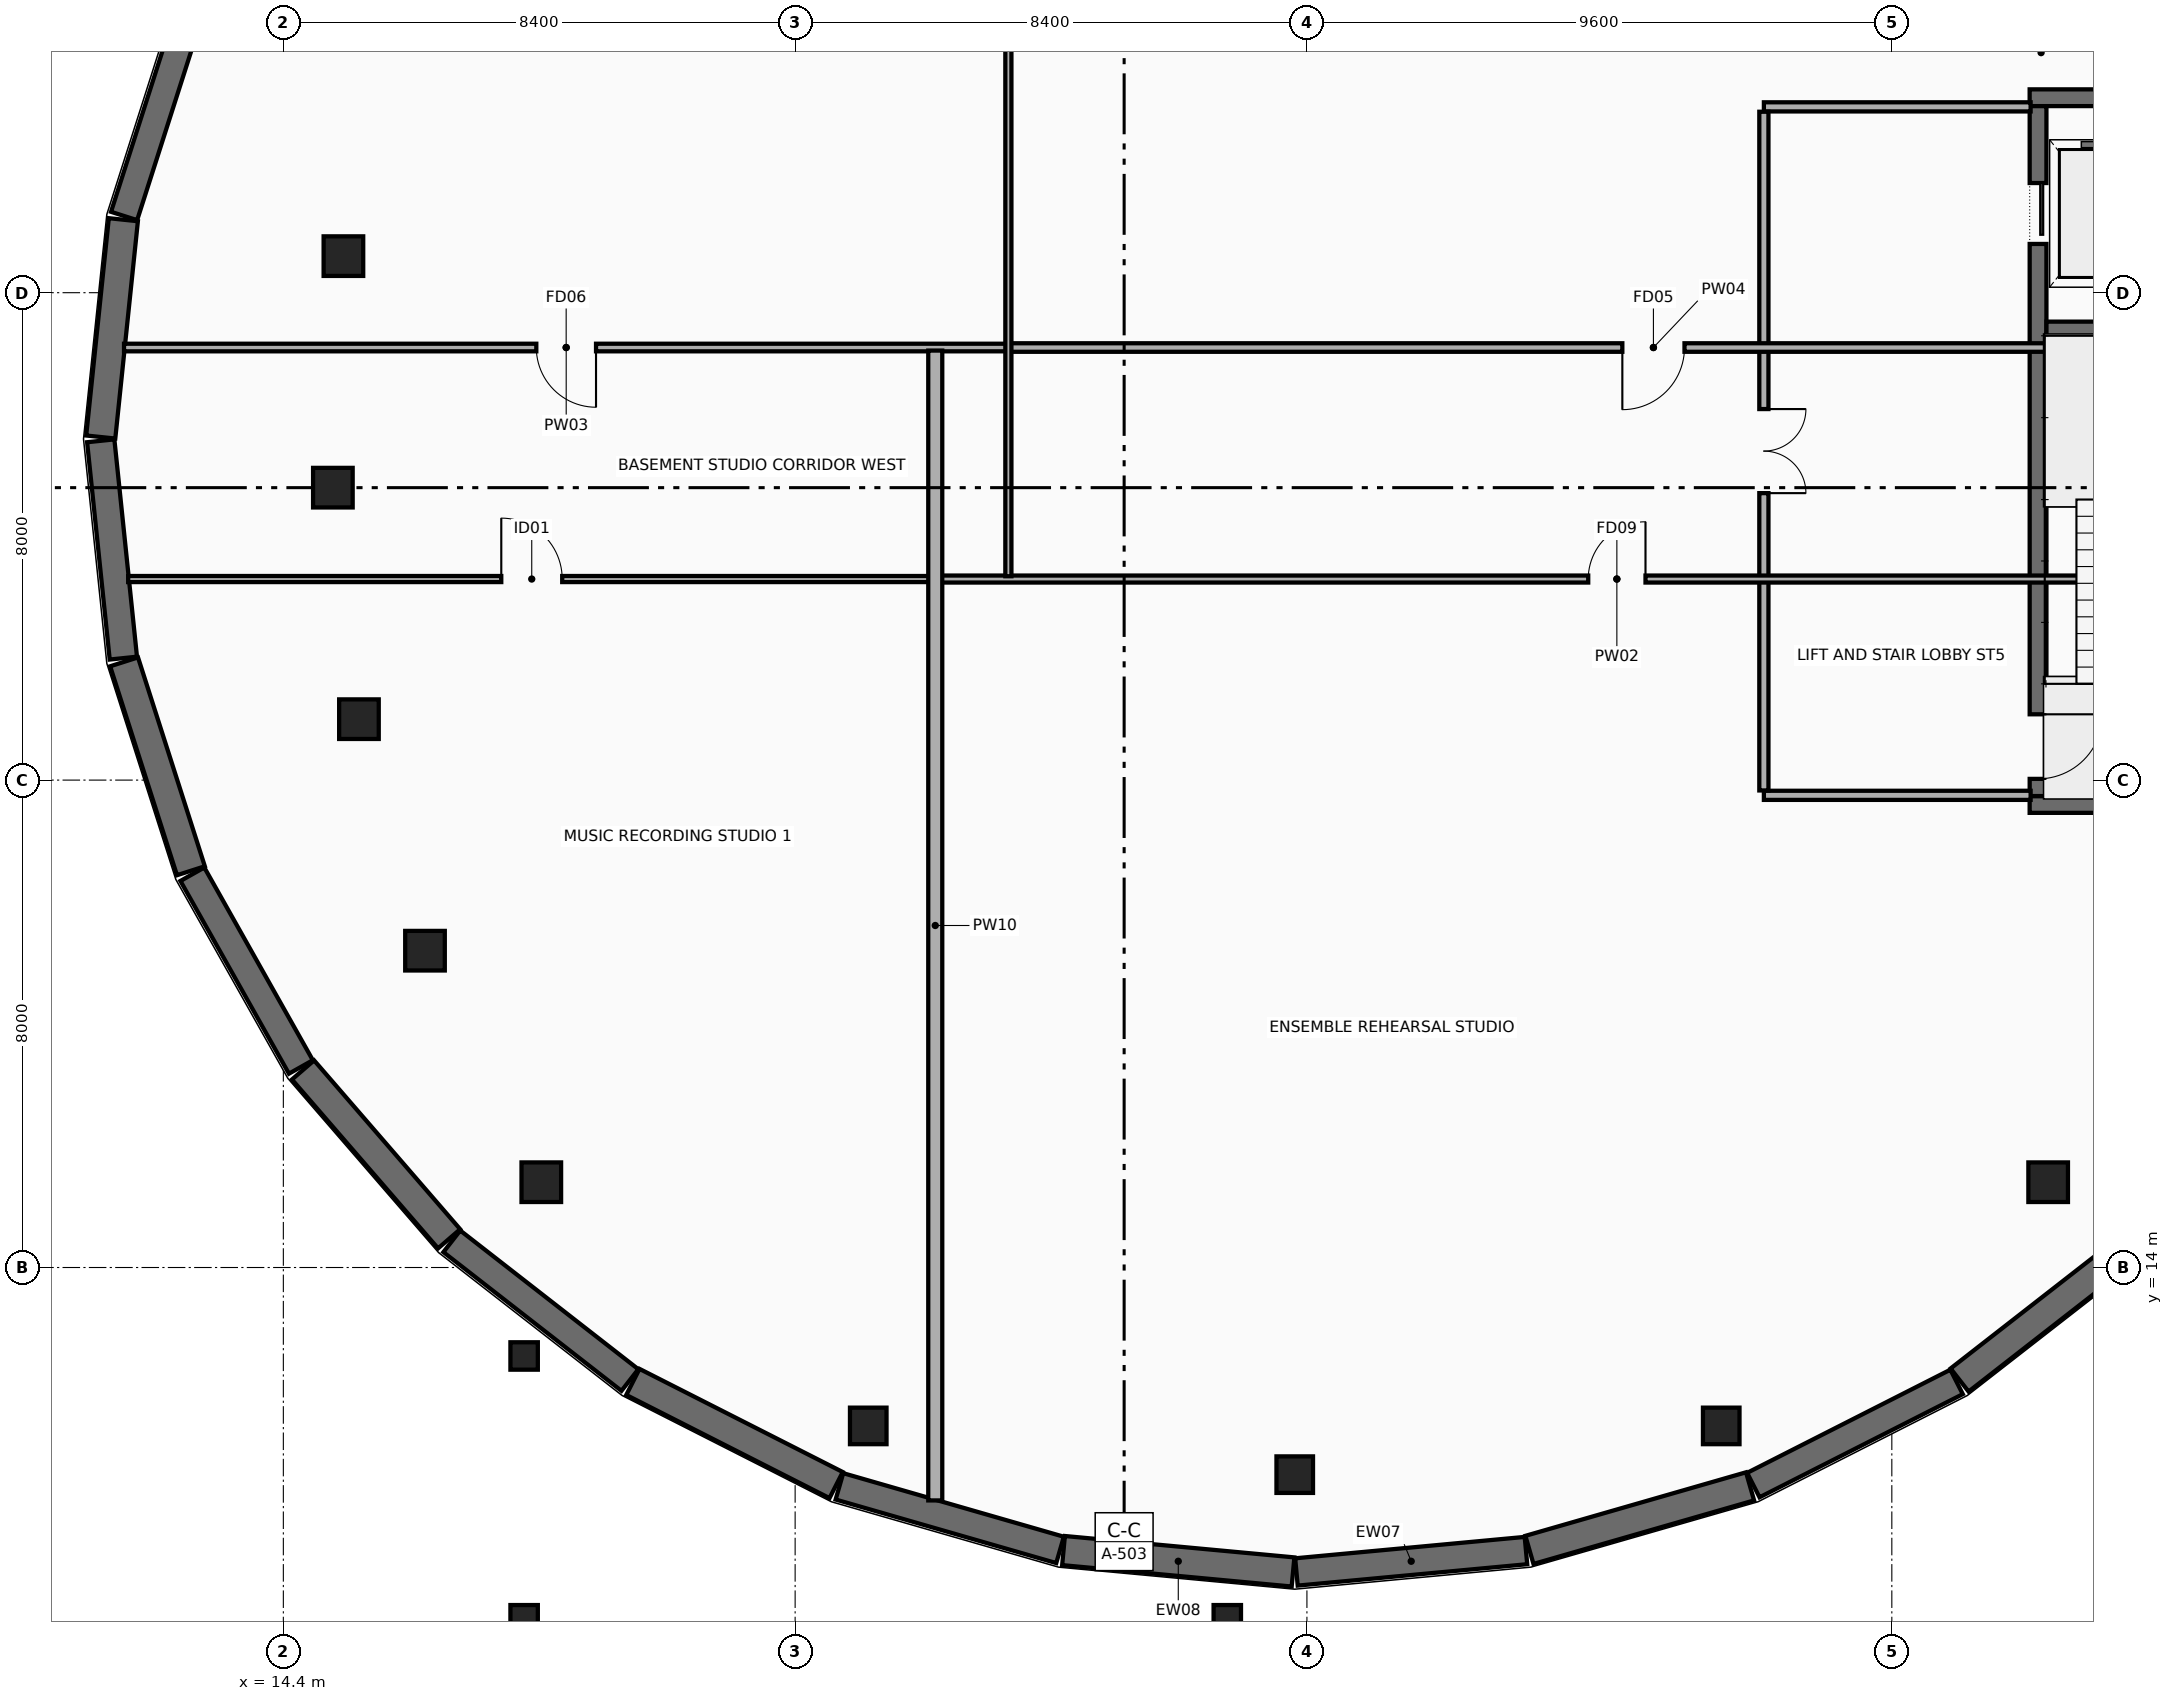
"""IFC4 building model, lengths in metres.
Left out: names, types, materials, properties, quantities, classifications, styles, units other than length and angle.
Written with IfcOpenShell. Run it as: python <this file> out.ifc"""

import sys

from ifc_helpers import new_model, si_unit, direction, frame, frame_2d, origin, origin_2d, place, context, subcontext, project, spatial, rectangle, extrude, element, fill, save


model = new_model("IFC4")
c1 = context("Model", 3, precision=1e-05, world=origin(), true_north=direction((0.0, 1.0)))
c2 = subcontext(c1, "Body", "Model", "MODEL_VIEW")
j1 = project(units=[si_unit("LENGTHUNIT", "METRE"), si_unit("PLANEANGLEUNIT", "RADIAN")], contexts=[c1])
p1 = place(None, origin())
s1 = spatial("IfcSite", under=j1, at=p1, CompositionType="ELEMENT")
p2 = place(p1, origin())
s2 = spatial("IfcBuilding", under=s1, at=p2, CompositionType="ELEMENT")
p3 = place(p2, frame((0.0, 0.0, -4.2)))
s3 = spatial("IfcBuildingStorey", under=s2, at=p3, CompositionType="ELEMENT", Elevation=-4.2)
for number, where, z_axis, x_axis in (
    (1, (43.062, 21.6, -0.415), (0.0, 0.0, 1.0), (1.0, 0.0, 0.0)),
    (2, (47.738, 33.2, -0.415), (0.0, 0.0, 1.0), (-1.0, 0.0, 0.0)),
):
    element("IfcWall", number, at=place(p3, frame(where, z_axis=z_axis, x_axis=x_axis)), inside=s3, PredefinedType="SHEAR", context=c2, shape_type="SweptSolid", body=[
        extrude(rectangle(XDim=4.676, YDim=0.275, at=frame_2d((2.338, 0.0))), origin(), (0.0, 0.0, 1.0), 4.615),
    ])
p4 = place(p3, frame((43.2, 33.062, -0.415), z_axis=(0.0, 0.0, 1.0), x_axis=(0.0, -1.0, 0.0)))
e3 = element("IfcWall", 3, at=p4, inside=s3, PredefinedType="SHEAR", context=c2, shape_type="SweptSolid", body=[
    extrude(rectangle(XDim=11.324, YDim=0.275, at=frame_2d((5.662, 0.0))), origin(), (0.0, 0.0, 1.0), 4.615),
])
p5 = place(p4, frame((1.262, 0.0, 0.415)))
e4 = element("IfcOpeningElement", 4, at=p5, cuts=e3, PredefinedType="OPENING", context=c2, shape_type="SweptSolid", body=[
    extrude(rectangle(XDim=1.0, YDim=2.15, at=frame_2d((0.5, 1.075))), frame((0.0, 0.147, 0.0), z_axis=(0.0, -1.0, 0.0), x_axis=(1.0, 0.0, 0.0)), (0.0, 0.0, 1.0), 0.295),
])
p6 = place(p4, frame((9.982, 0.0, 0.415)))
e5 = element("IfcOpeningElement", 5, at=p6, cuts=e3, PredefinedType="OPENING", context=c2, shape_type="SweptSolid", body=[
    extrude(rectangle(XDim=1.06, YDim=2.15, at=frame_2d((0.53, 1.075))), frame((0.0, 0.147, 0.0), z_axis=(0.0, -1.0, 0.0), x_axis=(1.0, 0.0, 0.0)), (0.0, 0.0, 1.0), 0.295),
])
p7 = place(p3, frame((43.338, 29.4, -0.415), z_axis=(0.0, 0.0, 1.0), x_axis=(1.0, 0.0, 0.0)))
e6 = element("IfcWall", 6, at=p7, inside=s3, PredefinedType="SHEAR", context=c2, shape_type="SweptSolid", body=[
    extrude(rectangle(XDim=4.124, YDim=0.25, at=frame_2d((2.062, 0.0))), origin(), (0.0, 0.0, 1.0), 4.615),
])
for number, where, z_axis, x_axis in (
    (7, (18.634, 15.4, -0.415), (0.0, 0.0, 1.0), (1.0, 0.0, 0.0)),
    (8, (43.366, 15.4, -0.415), (0.0, 0.0, 1.0), (1.0, 0.0, 0.0)),
    (9, (16.725, 19.2, -0.415), (0.0, 0.0, 1.0), (1.0, 0.0, 0.0)),
    (10, (15.641, 23.0, -0.415), (0.0, 0.0, 1.0), (1.0, 0.0, 0.0)),
    (11, (15.213, 26.8, -0.415), (0.0, 0.0, 1.0), (1.0, 0.0, 0.0)),
    (12, (15.386, 30.6, -0.415), (0.0, 0.0, 1.0), (1.0, 0.0, 0.0)),
):
    element("IfcColumn", number, at=place(p3, frame(where, z_axis=z_axis, x_axis=x_axis)), inside=s3, PredefinedType="COLUMN", context=c2, shape_type="SweptSolid", body=[
        extrude(rectangle(XDim=0.65, YDim=0.65, at=origin_2d()), origin(), (0.0, 0.0, 1.0), 4.615),
    ])
for number, where, z_axis, x_axis in (
    (13, (24.0, 11.4, -0.415), (0.0, 0.0, 1.0), (1.0, 0.0, 0.0)),
    (14, (31.0, 10.6, -0.415), (0.0, 0.0, 1.0), (1.0, 0.0, 0.0)),
    (15, (38.0, 11.4, -0.415), (0.0, 0.0, 1.0), (1.0, 0.0, 0.0)),
):
    element("IfcColumn", number, at=place(p3, frame(where, z_axis=z_axis, x_axis=x_axis)), inside=s3, PredefinedType="COLUMN", context=c2, shape_type="SweptSolid", body=[
        extrude(rectangle(XDim=0.6, YDim=0.6, at=origin_2d()), origin(), (0.0, 0.0, 1.0), 4.615),
    ])
for number, where, z_axis, x_axis in (
    (16, (18.352, 8.235, -0.415), (0.0, 0.0, 1.0), (1.0, 0.0, 0.0)),
    (17, (18.352, 12.548, -0.415), (0.0, 0.0, 1.0), (1.0, 0.0, 0.0)),
    (18, (29.893, 8.235, -0.415), (0.0, 0.0, 1.0), (1.0, 0.0, 0.0)),
):
    element("IfcColumn", number, at=place(p3, frame(where, z_axis=z_axis, x_axis=x_axis)), inside=s3, PredefinedType="COLUMN", context=c2, shape_type="SweptSolid", body=[
        extrude(rectangle(XDim=0.45, YDim=0.45, at=origin_2d()), origin(), (0.0, 0.0, 1.0), 4.333),
    ])
p8 = place(p3, frame((11.786, 31.259, 0.0), z_axis=(0.0, 0.0, 1.0), x_axis=(0.304751121455, 0.952432020657, 0.0)))
e19 = element("IfcWall", 19, at=p8, inside=s3, PredefinedType="STANDARD", context=c2, shape_type="SweptSolid", body=[
    extrude(rectangle(XDim=3.6, YDim=0.45, at=frame_2d((1.8, 0.0))), origin(), (0.0, 0.0, 1.0), 3.867),
])
p9 = place(p3, frame((11.403, 27.631, 0.0), z_axis=(0.0, 0.0, 1.0), x_axis=(0.103412455299, 0.994638559523, 0.0)))
e20 = element("IfcWall", 20, at=p9, inside=s3, PredefinedType="STANDARD", context=c2, shape_type="SweptSolid", body=[
    extrude(rectangle(XDim=3.586, YDim=0.48, at=frame_2d((1.793, 0.0))), origin(), (0.0, 0.0, 1.0), 3.867),
])
p10 = place(p3, frame((11.774, 24.002, 0.0), z_axis=(0.0, 0.0, 1.0), x_axis=(-0.103405453269, 0.994639287498, 0.0)))
e21 = element("IfcWall", 21, at=p10, inside=s3, PredefinedType="STANDARD", context=c2, shape_type="SweptSolid", body=[
    extrude(rectangle(XDim=3.586, YDim=0.45, at=frame_2d((1.793, 0.0))), origin(), (0.0, 0.0, 1.0), 3.867),
])
p11 = place(p3, frame((12.883, 20.512, 0.0), z_axis=(0.0, 0.0, 1.0), x_axis=(-0.304751121455, 0.952432020657, 0.0)))
e22 = element("IfcWall", 22, at=p11, inside=s3, PredefinedType="STANDARD", context=c2, shape_type="SweptSolid", body=[
    extrude(rectangle(XDim=3.6, YDim=0.48, at=frame_2d((1.8, 0.0))), origin(), (0.0, 0.0, 1.0), 3.867),
])
p12 = place(p3, frame((14.688, 17.292, 0.0), z_axis=(0.0, 0.0, 1.0), x_axis=(-0.490631601597, 0.871367104907, 0.0)))
e23 = element("IfcWall", 23, at=p12, inside=s3, PredefinedType="STANDARD", context=c2, shape_type="SweptSolid", body=[
    extrude(rectangle(XDim=3.63, YDim=0.45, at=frame_2d((1.815, 0.0))), origin(), (0.0, 0.0, 1.0), 3.867),
])
p13 = place(p3, frame((17.121, 14.471, 0.0), z_axis=(0.0, 0.0, 1.0), x_axis=(-0.654278596364, 0.756253607158, 0.0)))
e24 = element("IfcWall", 24, at=p13, inside=s3, PredefinedType="STANDARD", context=c2, shape_type="SweptSolid", body=[
    extrude(rectangle(XDim=3.665, YDim=0.48, at=frame_2d((1.833, 0.0))), origin(), (0.0, 0.0, 1.0), 3.867),
])
p14 = place(p3, frame((20.088, 12.153, 0.0), z_axis=(0.0, 0.0, 1.0), x_axis=(-0.788890732052, 0.614533492075, 0.0)))
e25 = element("IfcWall", 25, at=p14, inside=s3, PredefinedType="STANDARD", context=c2, shape_type="SweptSolid", body=[
    extrude(rectangle(XDim=3.705, YDim=0.45, at=frame_2d((1.853, 0.0))), origin(), (0.0, 0.0, 1.0), 3.867),
])
p15 = place(p3, frame((23.473, 10.429, 0.0), z_axis=(0.0, 0.0, 1.0), x_axis=(-0.891722284503, 0.452582994952, 0.0)))
e26 = element("IfcWall", 26, at=p15, inside=s3, PredefinedType="STANDARD", context=c2, shape_type="SweptSolid", body=[
    extrude(rectangle(XDim=3.741, YDim=0.48, at=frame_2d((1.871, 0.0))), origin(), (0.0, 0.0, 1.0), 3.867),
])
p16 = place(p3, frame((27.148, 9.365, 0.0), z_axis=(0.0, 0.0, 1.0), x_axis=(-0.960930032161, 0.276791389481, 0.0)))
e27 = element("IfcWall", 27, at=p16, inside=s3, PredefinedType="STANDARD", context=c2, shape_type="SweptSolid", body=[
    extrude(rectangle(XDim=3.768, YDim=0.45, at=frame_2d((1.884, 0.0))), origin(), (0.0, 0.0, 1.0), 3.867),
])
p17 = place(p3, frame((30.972, 9.003, 0.0), z_axis=(0.0, 0.0, 1.0), x_axis=(-0.995684868215, 0.092798939691, 0.0)))
e28 = element("IfcWall", 28, at=p17, inside=s3, PredefinedType="STANDARD", context=c2, shape_type="SweptSolid", body=[
    extrude(rectangle(XDim=3.783, YDim=0.48, at=frame_2d((1.892, 0.0))), origin(), (0.0, 0.0, 1.0), 3.867),
])
p18 = place(p3, frame((34.795, 9.354, 0.0), z_axis=(0.0, 0.0, 1.0), x_axis=(-0.995684868215, -0.092798939691, 0.0)))
e29 = element("IfcWall", 29, at=p18, inside=s3, PredefinedType="STANDARD", context=c2, shape_type="SweptSolid", body=[
    extrude(rectangle(XDim=3.783, YDim=0.45, at=frame_2d((1.892, 0.0))), origin(), (0.0, 0.0, 1.0), 3.867),
])
p19 = place(p3, frame((38.473, 10.408, 0.0), z_axis=(0.0, 0.0, 1.0), x_axis=(-0.960930032161, -0.276791389481, 0.0)))
e30 = element("IfcWall", 30, at=p19, inside=s3, PredefinedType="STANDARD", context=c2, shape_type="SweptSolid", body=[
    extrude(rectangle(XDim=3.768, YDim=0.48, at=frame_2d((1.884, 0.0))), origin(), (0.0, 0.0, 1.0), 3.867),
])
p20 = place(p3, frame((41.863, 12.122, 0.0), z_axis=(0.0, 0.0, 1.0), x_axis=(-0.891722284503, -0.452582994952, 0.0)))
e31 = element("IfcWall", 31, at=p20, inside=s3, PredefinedType="STANDARD", context=c2, shape_type="SweptSolid", body=[
    extrude(rectangle(XDim=3.741, YDim=0.45, at=frame_2d((1.871, 0.0))), origin(), (0.0, 0.0, 1.0), 3.867),
])
p21 = place(p3, frame((44.835, 14.43, 0.0), z_axis=(0.0, 0.0, 1.0), x_axis=(-0.788890732052, -0.614533492075, 0.0)))
e32 = element("IfcWall", 32, at=p21, inside=s3, PredefinedType="STANDARD", context=c2, shape_type="SweptSolid", body=[
    extrude(rectangle(XDim=3.705, YDim=0.48, at=frame_2d((1.853, 0.0))), origin(), (0.0, 0.0, 1.0), 3.867),
])
for number, where, z_axis, x_axis in (
    (33, (38.7, 21.75, 0.0), (0.0, 0.0, 1.0), (1.0, 0.0, 0.0)),
    (34, (43.078, 33.05, 0.0), (0.0, 0.0, 1.0), (-1.0, 0.0, 0.0)),
):
    element("IfcWall", number, at=place(p3, frame(where, z_axis=z_axis, x_axis=x_axis)), inside=s3, PredefinedType="PARTITIONING", context=c2, shape_type="SweptSolid", body=[
        extrude(rectangle(XDim=4.378, YDim=0.15, at=frame_2d((2.189, 0.0))), origin(), (0.0, 0.0, 1.0), 3.867),
    ])
p22 = place(p3, frame((38.7, 32.97, 0.0), z_axis=(0.0, 0.0, 1.0), x_axis=(0.0, -1.0, 0.0)))
e35 = element("IfcWall", 35, at=p22, inside=s3, PredefinedType="PARTITIONING", context=c2, shape_type="SweptSolid", body=[
    extrude(rectangle(XDim=11.14, YDim=0.15, at=frame_2d((5.57, 0.0))), origin(), (0.0, 0.0, 1.0), 3.005),
])
p23 = place(p22, frame((4.88, 0.0, 0.0)))
e36 = element("IfcOpeningElement", 36, at=p23, cuts=e35, PredefinedType="OPENING", context=c2, shape_type="SweptSolid", body=[
    extrude(rectangle(XDim=1.38, YDim=2.2, at=frame_2d((0.69, 1.1))), frame((0.0, 0.085, 0.0), z_axis=(0.0, -1.0, 0.0), x_axis=(1.0, 0.0, 0.0)), (0.0, 0.0, 1.0), 0.17),
])
p24 = place(p3, frame((11.853, 25.3, 0.0), z_axis=(0.0, 0.0, 1.0), x_axis=(1.0, 0.0, 0.0)))
e37 = element("IfcWall", 37, at=p24, inside=s3, PredefinedType="PARTITIONING", context=c2, shape_type="SweptSolid", body=[
    extrude(rectangle(XDim=13.247, YDim=0.1, at=frame_2d((6.624, 0.0))), origin(), (0.0, 0.0, 1.0), 3.055),
])
p25 = place(p24, frame((6.124, 0.0, 0.0)))
e38 = element("IfcOpeningElement", 38, at=p25, cuts=e37, PredefinedType="OPENING", context=c2, shape_type="SweptSolid", body=[
    extrude(rectangle(XDim=1.0, YDim=2.12, at=frame_2d((0.5, 1.06))), frame((0.0, 0.06, 0.0), z_axis=(0.0, -1.0, 0.0), x_axis=(1.0, 0.0, 0.0)), (0.0, 0.0, 1.0), 0.12),
])
p26 = place(p3, frame((25.1, 25.3, 0.0), z_axis=(0.0, 0.0, 1.0), x_axis=(1.0, 0.0, 0.0)))
e39 = element("IfcWall", 39, at=p26, inside=s3, PredefinedType="PARTITIONING", context=c2, shape_type="SweptSolid", body=[
    extrude(rectangle(XDim=22.374, YDim=0.115, at=frame_2d((11.187, 0.0))), origin(), (0.0, 0.0, 1.0), 3.867),
])
p27 = place(p26, frame((10.717, 0.0, 0.0)))
e40 = element("IfcOpeningElement", 40, at=p27, cuts=e39, PredefinedType="OPENING", context=c2, shape_type="SweptSolid", body=[
    extrude(rectangle(XDim=0.94, YDim=2.1, at=frame_2d((0.47, 1.05))), frame((0.0, 0.067, 0.0), z_axis=(0.0, -1.0, 0.0), x_axis=(1.0, 0.0, 0.0)), (0.0, 0.0, 1.0), 0.135),
])
p28 = place(p3, frame((26.3, 29.1, 0.0), z_axis=(0.0, 0.0, 1.0), x_axis=(-1.0, 0.0, 0.0)))
e41 = element("IfcWall", 41, at=p28, inside=s3, PredefinedType="PARTITIONING", context=c2, shape_type="SweptSolid", body=[
    extrude(rectangle(XDim=14.515, YDim=0.125, at=frame_2d((7.258, 0.0))), origin(), (0.0, 0.0, 1.0), 3.055),
])
p29 = place(p28, frame((6.768, 0.0, 0.0)))
e42 = element("IfcOpeningElement", 42, at=p29, cuts=e41, PredefinedType="OPENING", context=c2, shape_type="SweptSolid", body=[
    extrude(rectangle(XDim=0.98, YDim=2.12, at=frame_2d((0.49, 1.06))), frame((0.0, 0.073, 0.0), z_axis=(0.0, -1.0, 0.0), x_axis=(1.0, 0.0, 0.0)), (0.0, 0.0, 1.0), 0.145),
])
p30 = place(p3, frame((47.474, 29.1, 0.0), z_axis=(0.0, 0.0, 1.0), x_axis=(-1.0, 0.0, 0.0)))
e43 = element("IfcWall", 43, at=p30, inside=s3, PredefinedType="PARTITIONING", context=c2, shape_type="SweptSolid", body=[
    extrude(rectangle(XDim=21.174, YDim=0.14, at=frame_2d((10.587, 0.0))), origin(), (0.0, 0.0, 1.0), 3.867),
])
p31 = place(p30, frame((10.077, 0.0, 0.0)))
e44 = element("IfcOpeningElement", 44, at=p31, cuts=e43, PredefinedType="OPENING", context=c2, shape_type="SweptSolid", body=[
    extrude(rectangle(XDim=1.02, YDim=2.14, at=frame_2d((0.51, 1.07))), frame((0.0, 0.08, 0.0), z_axis=(0.0, -1.0, 0.0), x_axis=(1.0, 0.0, 0.0)), (0.0, 0.0, 1.0), 0.16),
])
p32 = place(p3, frame((25.1, 10.177, 0.0), z_axis=(0.0, 0.0, 1.0), x_axis=(0.0, 1.0, 0.0)))
e45 = element("IfcWall", 45, at=p32, inside=s3, PredefinedType="PARTITIONING", context=c2, shape_type="SweptSolid", body=[
    extrude(rectangle(XDim=18.873, YDim=0.23, at=frame_2d((9.437, 0.0))), origin(), (0.0, 0.0, 1.0), 3.005),
])
p33 = place(p3, frame((26.3, 25.346, 0.0), z_axis=(0.0, 0.0, 1.0), x_axis=(0.0, 1.0, 0.0)))
e46 = element("IfcWall", 46, at=p33, inside=s3, PredefinedType="PARTITIONING", context=c2, shape_type="SweptSolid", body=[
    extrude(rectangle(XDim=20.007, YDim=0.1, at=frame_2d((10.003, 0.0))), origin(), (0.0, 0.0, 1.0), 3.005),
])
p34 = place(p5, origin())
e47 = element("IfcDoor", 47, at=p34, inside=s3, OperationType="SLIDING_TO_LEFT", PredefinedType="DOOR", context=c2, shape_type="SweptSolid", body=[
    extrude(rectangle(XDim=1.0, YDim=2.15, at=frame_2d((0.5, 1.075))), frame((0.0, 0.025, 0.0), z_axis=(0.0, -1.0, 0.0), x_axis=(1.0, 0.0, 0.0)), (0.0, 0.0, 1.0), 0.05),
])
fill(e4, e47)
p35 = place(p6, origin())
e48 = element("IfcDoor", 48, at=p35, inside=s3, OperationType="SINGLE_SWING_LEFT", PredefinedType="DOOR", context=c2, shape_type="SweptSolid", body=[
    extrude(rectangle(XDim=1.06, YDim=2.15, at=frame_2d((0.53, 1.075))), frame((0.0, 0.025, 0.0), z_axis=(0.0, -1.0, 0.0), x_axis=(1.0, 0.0, 0.0)), (0.0, 0.0, 1.0), 0.05),
])
fill(e5, e48)
p36 = place(p23, origin())
e49 = element("IfcDoor", 49, at=p36, inside=s3, OperationType="DOUBLE_DOOR_SINGLE_SWING", PredefinedType="DOOR", context=c2, shape_type="SweptSolid", body=[
    extrude(rectangle(XDim=1.38, YDim=2.2, at=frame_2d((0.69, 1.1))), frame((0.0, 0.025, 0.0), z_axis=(0.0, -1.0, 0.0), x_axis=(1.0, 0.0, 0.0)), (0.0, 0.0, 1.0), 0.05),
])
fill(e36, e49)
p37 = place(p25, origin())
e50 = element("IfcDoor", 50, at=p37, inside=s3, OperationType="SINGLE_SWING_LEFT", PredefinedType="DOOR", context=c2, shape_type="SweptSolid", body=[
    extrude(rectangle(XDim=1.0, YDim=2.12, at=frame_2d((0.5, 1.06))), frame((0.0, 0.025, 0.0), z_axis=(0.0, -1.0, 0.0), x_axis=(1.0, 0.0, 0.0)), (0.0, 0.0, 1.0), 0.05),
])
fill(e38, e50)
p38 = place(p27, origin())
e51 = element("IfcDoor", 51, at=p38, inside=s3, OperationType="SINGLE_SWING_RIGHT", PredefinedType="DOOR", context=c2, shape_type="SweptSolid", body=[
    extrude(rectangle(XDim=0.94, YDim=2.1, at=frame_2d((0.47, 1.05))), frame((0.0, 0.025, 0.0), z_axis=(0.0, -1.0, 0.0), x_axis=(1.0, 0.0, 0.0)), (0.0, 0.0, 1.0), 0.05),
])
fill(e40, e51)
p39 = place(p29, origin())
e52 = element("IfcDoor", 52, at=p39, inside=s3, OperationType="SINGLE_SWING_LEFT", PredefinedType="DOOR", context=c2, shape_type="SweptSolid", body=[
    extrude(rectangle(XDim=0.98, YDim=2.12, at=frame_2d((0.49, 1.06))), frame((0.0, 0.025, 0.0), z_axis=(0.0, -1.0, 0.0), x_axis=(1.0, 0.0, 0.0)), (0.0, 0.0, 1.0), 0.05),
])
fill(e42, e52)
p40 = place(p31, origin())
e53 = element("IfcDoor", 53, at=p40, inside=s3, OperationType="SINGLE_SWING_RIGHT", PredefinedType="DOOR", context=c2, shape_type="SweptSolid", body=[
    extrude(rectangle(XDim=1.02, YDim=2.14, at=frame_2d((0.51, 1.07))), frame((0.0, 0.025, 0.0), z_axis=(0.0, -1.0, 0.0), x_axis=(1.0, 0.0, 0.0)), (0.0, 0.0, 1.0), 0.05),
])
fill(e44, e53)
save(model, sys.argv[1])
